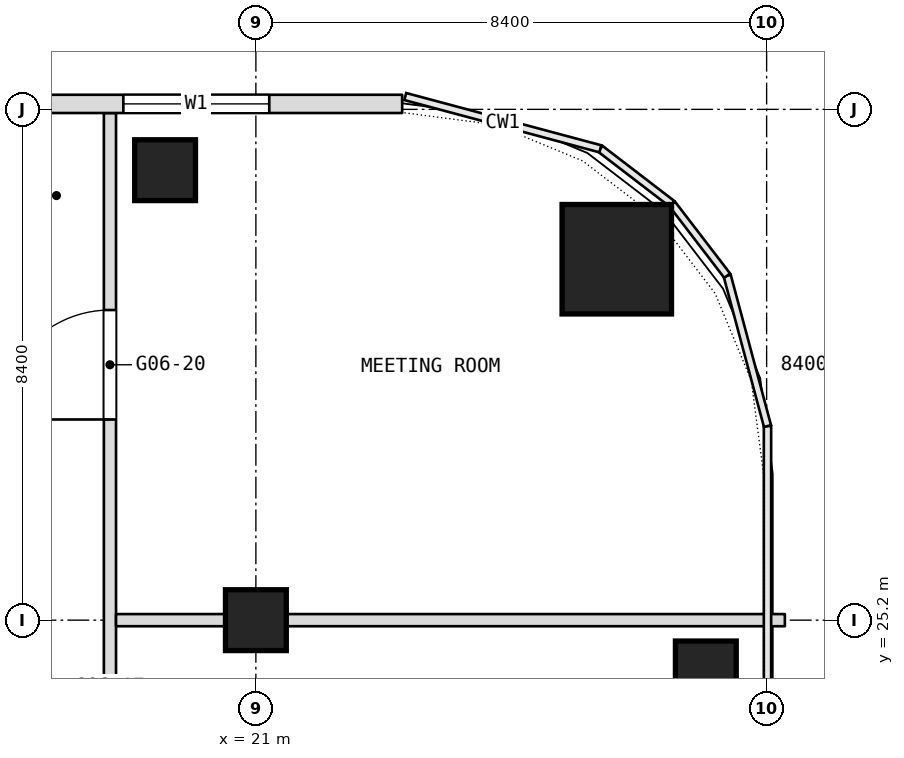
"""IFC4 building model, lengths in metres.
Left out: names, types, materials, properties, quantities, classifications, styles, units other than length and angle.
Written with IfcOpenShell. Run it as: python <this file> out.ifc"""

import sys

from ifc_helpers import new_model, si_unit, direction, frame, frame_2d, origin, origin_2d, place, context, subcontext, project, spatial, rectangle, extrude, element, fill, save


model = new_model("IFC4")
c1 = context("Model", 3, precision=1e-05, world=origin(), true_north=direction((0.0, 1.0)))
c2 = subcontext(c1, "Body", "Model", "MODEL_VIEW")
j1 = project(units=[si_unit("LENGTHUNIT", "METRE"), si_unit("PLANEANGLEUNIT", "RADIAN")], contexts=[c1])
p1 = place(None, origin())
s1 = spatial("IfcSite", under=j1, at=p1, CompositionType="ELEMENT")
p2 = place(p1, origin())
s2 = spatial("IfcBuilding", under=s1, at=p2, CompositionType="ELEMENT")
p3 = place(p2, frame((0.0, 0.0, 72.5)))
s3 = spatial("IfcBuildingStorey", under=s2, at=p3, CompositionType="ELEMENT", Elevation=72.5)
p4 = place(p3, frame((26.936, 31.135, 0.0), z_axis=(0.0, 0.0, 1.0), x_axis=(1.0, 0.0, 0.0)))
e1 = element("IfcColumn", 1, at=p4, inside=s3, PredefinedType="COLUMN", context=c2, shape_type="SweptSolid", body=[
    extrude(rectangle(XDim=1.8, YDim=1.8, at=origin_2d()), origin(), (0.0, 0.0, 1.0), 3.6),
])
for number, where, z_axis, x_axis in (
    (2, (21.0, 25.2, 0.0), (0.0, 0.0, 1.0), (1.0, 0.0, 0.0)),
    (3, (19.507, 32.6, 0.0), (0.0, 0.0, 1.0), (1.0, 0.0, 0.0)),
    (4, (28.4, 24.356, 0.0), (0.0, 0.0, 1.0), (1.0, 0.0, 0.0)),
):
    element("IfcColumn", number, at=place(p3, frame(where, z_axis=z_axis, x_axis=x_axis)), inside=s3, PredefinedType="COLUMN", context=c2, shape_type="SweptSolid", body=[
        extrude(rectangle(XDim=1.0, YDim=1.0, at=origin_2d()), origin(), (0.0, 0.0, 1.0), 3.6),
    ])
p5 = place(p3, frame((18.6, -16.665, 0.0), z_axis=(0.0, 0.0, 1.0), x_axis=(0.0, 1.0, 0.0)))
e5 = element("IfcWall", 5, at=p5, inside=s3, PredefinedType="PARTITIONING", context=c2, shape_type="SweptSolid", body=[
    extrude(rectangle(XDim=50.205, YDim=0.2, at=frame_2d((25.103, 0.0))), origin(), (0.0, 0.0, 1.0), 3.34),
])
p6 = place(p5, frame((4.0, 0.0, 0.0)))
e6 = element("IfcOpeningElement", 6, at=p6, cuts=e5, PredefinedType="OPENING", context=c2, shape_type="SweptSolid", body=[
    extrude(rectangle(XDim=1.1, YDim=2.1, at=frame_2d((0.55, 1.05))), frame((0.0, 0.1, 0.0), z_axis=(0.0, -1.0, 0.0), x_axis=(1.0, 0.0, 0.0)), (0.0, 0.0, 1.0), 0.2),
])
p7 = place(p5, frame((8.665, 0.0, 0.0)))
e7 = element("IfcOpeningElement", 7, at=p7, cuts=e5, PredefinedType="OPENING", context=c2, shape_type="SweptSolid", body=[
    extrude(rectangle(XDim=1.0, YDim=2.1, at=frame_2d((0.5, 1.05))), frame((0.0, 0.1, 0.0), z_axis=(0.0, -1.0, 0.0), x_axis=(1.0, 0.0, 0.0)), (0.0, 0.0, 1.0), 0.2),
])
p8 = place(p5, frame((15.265, 0.0, 0.0)))
e8 = element("IfcOpeningElement", 8, at=p8, cuts=e5, PredefinedType="OPENING", context=c2, shape_type="SweptSolid", body=[
    extrude(rectangle(XDim=1.0, YDim=2.1, at=frame_2d((0.5, 1.05))), frame((0.0, 0.1, 0.0), z_axis=(0.0, -1.0, 0.0), x_axis=(1.0, 0.0, 0.0)), (0.0, 0.0, 1.0), 0.2),
])
p9 = place(p5, frame((19.965, 0.0, 0.0)))
e9 = element("IfcOpeningElement", 9, at=p9, cuts=e5, PredefinedType="OPENING", context=c2, shape_type="SweptSolid", body=[
    extrude(rectangle(XDim=1.8, YDim=2.1, at=frame_2d((0.9, 1.05))), frame((0.0, 0.1, 0.0), z_axis=(0.0, -1.0, 0.0), x_axis=(1.0, 0.0, 0.0)), (0.0, 0.0, 1.0), 0.2),
])
p10 = place(p5, frame((28.665, 0.0, 0.0)))
e10 = element("IfcOpeningElement", 10, at=p10, cuts=e5, PredefinedType="OPENING", context=c2, shape_type="SweptSolid", body=[
    extrude(rectangle(XDim=1.1, YDim=2.1, at=frame_2d((0.55, 1.05))), frame((0.0, 0.1, 0.0), z_axis=(0.0, -1.0, 0.0), x_axis=(1.0, 0.0, 0.0)), (0.0, 0.0, 1.0), 0.2),
])
p11 = place(p5, frame((39.215, 0.0, 0.0)))
e11 = element("IfcOpeningElement", 11, at=p11, cuts=e5, PredefinedType="OPENING", context=c2, shape_type="SweptSolid", body=[
    extrude(rectangle(XDim=1.1, YDim=2.1, at=frame_2d((0.55, 1.05))), frame((0.0, 0.1, 0.0), z_axis=(0.0, -1.0, 0.0), x_axis=(1.0, 0.0, 0.0)), (0.0, 0.0, 1.0), 0.2),
])
p12 = place(p5, frame((45.165, 0.0, 0.0)))
e12 = element("IfcOpeningElement", 12, at=p12, cuts=e5, PredefinedType="OPENING", context=c2, shape_type="SweptSolid", body=[
    extrude(rectangle(XDim=1.8, YDim=2.1, at=frame_2d((0.9, 1.05))), frame((0.0, 0.1, 0.0), z_axis=(0.0, -1.0, 0.0), x_axis=(1.0, 0.0, 0.0)), (0.0, 0.0, 1.0), 0.2),
])
p13 = place(p3, frame((18.7, 25.2, 0.0), z_axis=(0.0, 0.0, 1.0), x_axis=(1.0, 0.0, 0.0)))
e13 = element("IfcWall", 13, at=p13, inside=s3, PredefinedType="PARTITIONING", context=c2, shape_type="SweptSolid", body=[
    extrude(rectangle(XDim=11.0, YDim=0.2, at=frame_2d((5.5, 0.0))), origin(), (0.0, 0.0, 1.0), 2.84),
])
p14 = place(p3, frame((23.406, 33.69, 0.0), z_axis=(0.0, 0.0, 1.0), x_axis=(-1.0, 0.0, 0.0)))
e14 = element("IfcWall", 14, at=p14, inside=s3, PredefinedType="NOTDEFINED", context=c2, shape_type="SweptSolid", body=[
    extrude(rectangle(XDim=46.812, YDim=0.3, at=frame_2d((23.406, 0.0))), origin(), (0.0, 0.0, 1.0), 3.6),
])
p15 = place(p14, frame((2.186, 0.0, 0.9)))
e15 = element("IfcOpeningElement", 15, at=p15, cuts=e14, PredefinedType="OPENING", context=c2, shape_type="SweptSolid", body=[
    extrude(rectangle(XDim=2.4, YDim=2.1, at=frame_2d((1.2, 1.05))), frame((0.0, 0.15, 0.0), z_axis=(0.0, -1.0, 0.0), x_axis=(1.0, 0.0, 0.0)), (0.0, 0.0, 1.0), 0.3),
])
p16 = place(p14, frame((7.506, 0.0, 0.9)))
e16 = element("IfcOpeningElement", 16, at=p16, cuts=e14, PredefinedType="OPENING", context=c2, shape_type="SweptSolid", body=[
    extrude(rectangle(XDim=2.4, YDim=2.1, at=frame_2d((1.2, 1.05))), frame((0.0, 0.15, 0.0), z_axis=(0.0, -1.0, 0.0), x_axis=(1.0, 0.0, 0.0)), (0.0, 0.0, 1.0), 0.3),
])
p17 = place(p14, frame((11.706, 0.0, 0.9)))
e17 = element("IfcOpeningElement", 17, at=p17, cuts=e14, PredefinedType="OPENING", context=c2, shape_type="SweptSolid", body=[
    extrude(rectangle(XDim=2.4, YDim=2.1, at=frame_2d((1.2, 1.05))), frame((0.0, 0.15, 0.0), z_axis=(0.0, -1.0, 0.0), x_axis=(1.0, 0.0, 0.0)), (0.0, 0.0, 1.0), 0.3),
])
p18 = place(p14, frame((15.906, 0.0, 0.9)))
e18 = element("IfcOpeningElement", 18, at=p18, cuts=e14, PredefinedType="OPENING", context=c2, shape_type="SweptSolid", body=[
    extrude(rectangle(XDim=2.4, YDim=2.1, at=frame_2d((1.2, 1.05))), frame((0.0, 0.15, 0.0), z_axis=(0.0, -1.0, 0.0), x_axis=(1.0, 0.0, 0.0)), (0.0, 0.0, 1.0), 0.3),
])
p19 = place(p14, frame((20.106, 0.0, 0.9)))
e19 = element("IfcOpeningElement", 19, at=p19, cuts=e14, PredefinedType="OPENING", context=c2, shape_type="SweptSolid", body=[
    extrude(rectangle(XDim=2.4, YDim=2.1, at=frame_2d((1.2, 1.05))), frame((0.0, 0.15, 0.0), z_axis=(0.0, -1.0, 0.0), x_axis=(1.0, 0.0, 0.0)), (0.0, 0.0, 1.0), 0.3),
])
p20 = place(p14, frame((24.306, 0.0, 0.9)))
e20 = element("IfcOpeningElement", 20, at=p20, cuts=e14, PredefinedType="OPENING", context=c2, shape_type="SweptSolid", body=[
    extrude(rectangle(XDim=2.4, YDim=2.1, at=frame_2d((1.2, 1.05))), frame((0.0, 0.15, 0.0), z_axis=(0.0, -1.0, 0.0), x_axis=(1.0, 0.0, 0.0)), (0.0, 0.0, 1.0), 0.3),
])
p21 = place(p14, frame((28.506, 0.0, 0.9)))
e21 = element("IfcOpeningElement", 21, at=p21, cuts=e14, PredefinedType="OPENING", context=c2, shape_type="SweptSolid", body=[
    extrude(rectangle(XDim=2.4, YDim=2.1, at=frame_2d((1.2, 1.05))), frame((0.0, 0.15, 0.0), z_axis=(0.0, -1.0, 0.0), x_axis=(1.0, 0.0, 0.0)), (0.0, 0.0, 1.0), 0.3),
])
p22 = place(p14, frame((32.706, 0.0, 0.9)))
e22 = element("IfcOpeningElement", 22, at=p22, cuts=e14, PredefinedType="OPENING", context=c2, shape_type="SweptSolid", body=[
    extrude(rectangle(XDim=2.4, YDim=2.1, at=frame_2d((1.2, 1.05))), frame((0.0, 0.15, 0.0), z_axis=(0.0, -1.0, 0.0), x_axis=(1.0, 0.0, 0.0)), (0.0, 0.0, 1.0), 0.3),
])
p23 = place(p14, frame((36.906, 0.0, 0.9)))
e23 = element("IfcOpeningElement", 23, at=p23, cuts=e14, PredefinedType="OPENING", context=c2, shape_type="SweptSolid", body=[
    extrude(rectangle(XDim=2.4, YDim=2.1, at=frame_2d((1.2, 1.05))), frame((0.0, 0.15, 0.0), z_axis=(0.0, -1.0, 0.0), x_axis=(1.0, 0.0, 0.0)), (0.0, 0.0, 1.0), 0.3),
])
p24 = place(p14, frame((42.226, 0.0, 0.9)))
e24 = element("IfcOpeningElement", 24, at=p24, cuts=e14, PredefinedType="OPENING", context=c2, shape_type="SweptSolid", body=[
    extrude(rectangle(XDim=2.4, YDim=2.1, at=frame_2d((1.2, 1.05))), frame((0.0, 0.15, 0.0), z_axis=(0.0, -1.0, 0.0), x_axis=(1.0, 0.0, 0.0)), (0.0, 0.0, 1.0), 0.3),
])
p25 = place(p12, origin())
e25 = element("IfcDoor", 25, at=p25, inside=s3, OperationType="DOUBLE_DOOR_SINGLE_SWING", PredefinedType="DOOR", context=c2, shape_type="SweptSolid", body=[
    extrude(rectangle(XDim=1.8, YDim=2.1, at=frame_2d((0.9, 1.05))), frame((0.0, 0.025, 0.0), z_axis=(0.0, -1.0, 0.0), x_axis=(1.0, 0.0, 0.0)), (0.0, 0.0, 1.0), 0.05),
])
fill(e12, e25)
p26 = place(p15, origin())
e26 = element("IfcWindow", 26, at=p26, inside=s3, PartitioningType="SINGLE_PANEL", PredefinedType="WINDOW", context=c2, shape_type="SweptSolid", body=[
    extrude(rectangle(XDim=2.4, YDim=2.1, at=frame_2d((1.2, 1.05))), frame((0.0, 0.03, 0.0), z_axis=(0.0, -1.0, 0.0), x_axis=(1.0, 0.0, 0.0)), (0.0, 0.0, 1.0), 0.06),
])
fill(e15, e26)
save(model, sys.argv[1])
